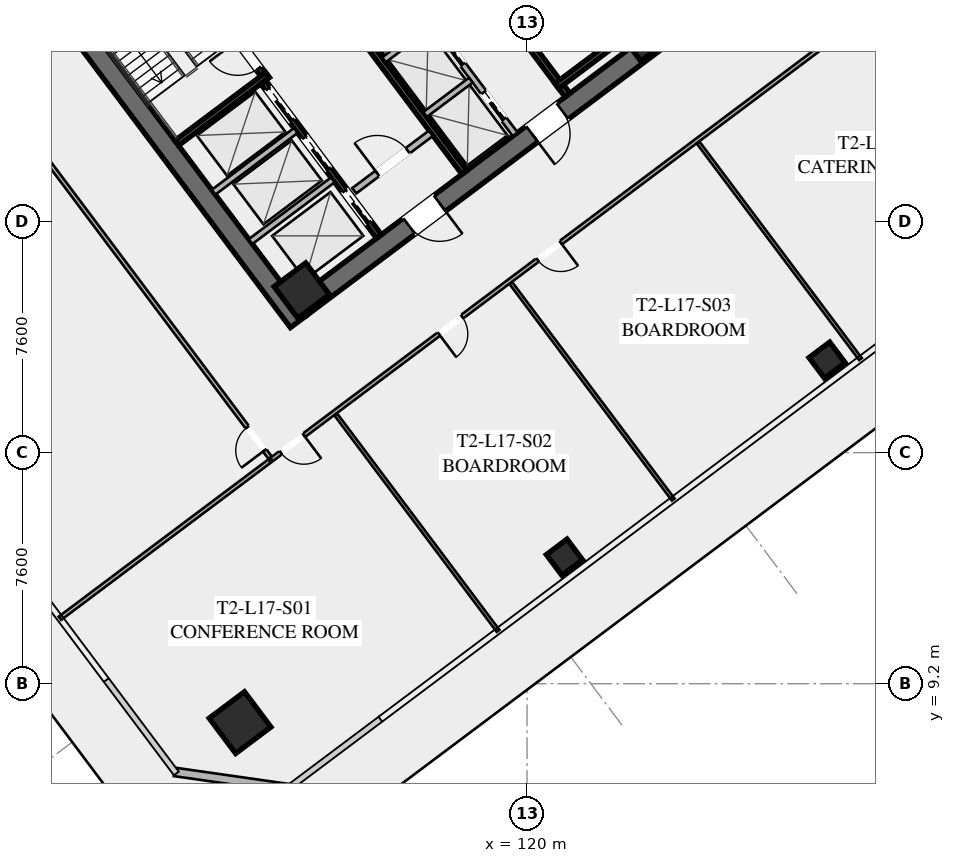
"""IFC4 building model, lengths in metres.
Left out: names, types, materials, properties, quantities, classifications, styles, units other than length and angle.
Written with IfcOpenShell. Run it as: python <this file> out.ifc"""

import sys

from ifc_helpers import new_model, si_unit, direction, frame, frame_2d, origin, origin_2d, place, context, subcontext, project, spatial, rectangle, hollow_rectangle, extrude, element, fill, save


model = new_model("IFC4")
c1 = context("Model", 3, precision=1e-05, world=origin(), true_north=direction((0.0, 1.0)))
c2 = subcontext(c1, "Body", "Model", "MODEL_VIEW")
j1 = project(units=[si_unit("LENGTHUNIT", "METRE"), si_unit("PLANEANGLEUNIT", "RADIAN")], contexts=[c1])
p1 = place(None, origin())
s1 = spatial("IfcSite", under=j1, at=p1, CompositionType="ELEMENT")
p2 = place(p1, origin())
s2 = spatial("IfcBuilding", under=s1, at=p2, CompositionType="ELEMENT")
p3 = place(p2, frame((0.0, 0.0, 67.2)))
s3 = spatial("IfcBuildingStorey", under=s2, at=p3, CompositionType="ELEMENT", Elevation=67.2)
p4 = place(p3, frame((112.476, 21.107, 0.0), z_axis=(0.0, 0.0, 1.0), x_axis=(-0.600005007985, 0.799996243986, 0.0)))
e1 = element("IfcWall", 1, at=p4, inside=s3, PredefinedType="SHEAR", context=c2, shape_type="SweptSolid", body=[
    extrude(rectangle(XDim=15.6, YDim=0.65, at=frame_2d((7.8, 0.0))), origin(), (0.0, 0.0, 1.0), 3.55),
])
p5 = place(p3, frame((124.429, 30.478, 0.0), z_axis=(0.0, 0.0, 1.0), x_axis=(-0.799998028465, -0.600002628705, 0.0)))
e2 = element("IfcWall", 2, at=p5, inside=s3, PredefinedType="SHEAR", context=c2, shape_type="SweptSolid", body=[
    extrude(rectangle(XDim=14.86, YDim=0.65, at=frame_2d((7.43, 0.0))), origin(), (0.0, 0.0, 1.0), 3.55),
])
p6 = place(p5, frame((9.13, 0.0, 0.0)))
e3 = element("IfcOpeningElement", 3, at=p6, cuts=e2, PredefinedType="OPENING", context=c2, shape_type="SweptSolid", body=[
    extrude(rectangle(XDim=1.25, YDim=2.25, at=frame_2d((0.625, 1.125))), frame((0.0, 0.335, 0.0), z_axis=(0.0, -1.0, 0.0), x_axis=(1.0, 0.0, 0.0)), (0.0, 0.0, 1.0), 0.67),
])
p7 = place(p5, frame((4.08, 0.0, 0.0)))
e4 = element("IfcOpeningElement", 4, at=p7, cuts=e2, PredefinedType="OPENING", context=c2, shape_type="SweptSolid", body=[
    extrude(rectangle(XDim=1.25, YDim=2.25, at=frame_2d((0.625, 1.125))), frame((0.0, 0.335, 0.0), z_axis=(0.0, -1.0, 0.0), x_axis=(1.0, 0.0, 0.0)), (0.0, 0.0, 1.0), 0.67),
])
for number, where, z_axis, x_axis in (
    (5, (112.59, 22.13, 0.0), (0.0, 0.0, 1.0), (0.8, 0.6, 0.0)),
    (6, (123.87, 30.59, 0.0), (0.0, 0.0, 1.0), (0.8, 0.6, 0.0)),
):
    element("IfcColumn", number, at=place(p3, frame(where, z_axis=z_axis, x_axis=x_axis)), inside=s3, PredefinedType="COLUMN", context=c2, shape_type="SweptSolid", body=[
        extrude(hollow_rectangle(XDim=1.3, YDim=1.3, WallThickness=0.05, at=origin_2d()), origin(), (0.0, 0.0, 1.0), 3.35),
    ])
p8 = place(p3, frame((110.56, 7.92, -0.195), z_axis=(0.0, 0.0, 1.0), x_axis=(0.799999996291, 0.600000004945, 0.0)))
e7 = element("IfcColumn", 7, at=p8, inside=s3, PredefinedType="COLUMN", context=c2, shape_type="SweptSolid", body=[
    extrude(hollow_rectangle(XDim=1.45, YDim=1.45, WallThickness=0.055, at=origin_2d()), origin(), (0.0, 0.0, 1.0), 3.545),
])
for number, where, z_axis, x_axis in (
    (8, (121.23, 13.36, -0.195), (0.0, 0.0, 1.0), (0.8, 0.6, 0.0)),
    (9, (129.87, 19.84, -0.195), (0.0, 0.0, 1.0), (0.8, 0.6, 0.0)),
):
    element("IfcColumn", number, at=place(p3, frame(where, z_axis=z_axis, x_axis=x_axis)), inside=s3, PredefinedType="COLUMN", context=c2, shape_type="SweptSolid", body=[
        extrude(hollow_rectangle(XDim=0.85, YDim=0.85, WallThickness=0.035, at=origin_2d()), origin(), (0.0, 0.0, 1.0), 3.545),
    ])
p9 = place(p3, frame((112.18, 5.76, 0.0), z_axis=(0.0, 0.0, 1.0), x_axis=(-0.989948214866, 0.141430307517, 0.0)))
e10 = element("IfcWall", 10, at=p9, inside=s3, PredefinedType="SOLIDWALL", context=c2, shape_type="SweptSolid", body=[
    extrude(rectangle(XDim=3.818, YDim=0.28, at=frame_2d((1.909, 0.0))), origin(), (0.0, 0.0, 1.0), 3.35),
])
p10 = place(p3, frame((111.44, 29.08, 0.0), z_axis=(0.0, 0.0, 1.0), x_axis=(-0.600009827119, 0.799992629566, 0.0)))
e11 = element("IfcWall", 11, at=p10, inside=s3, PredefinedType="SHEAR", context=c2, shape_type="SweptSolid", body=[
    extrude(rectangle(XDim=7.95, YDim=0.2, at=frame_2d((3.975, 0.0))), origin(), (0.0, 0.0, 1.0), 3.35),
])
p11 = place(p10, frame((0.45, 0.0, 0.0)))
e12 = element("IfcOpeningElement", 12, at=p11, cuts=e11, PredefinedType="OPENING", context=c2, shape_type="SweptSolid", body=[
    extrude(rectangle(XDim=1.15, YDim=2.2, at=frame_2d((0.575, 1.1))), frame((0.0, 0.11, 0.0), z_axis=(0.0, -1.0, 0.0), x_axis=(1.0, 0.0, 0.0)), (0.0, 0.0, 1.0), 0.22),
])
p12 = place(p3, frame((108.476, 26.982, 0.0), z_axis=(0.0, 0.0, 1.0), x_axis=(0.799984290658, 0.600020945218, 0.0)))
e13 = element("IfcWall", 13, at=p12, inside=s3, PredefinedType="SHEAR", context=c2, shape_type="SweptSolid", body=[
    extrude(rectangle(XDim=3.73, YDim=0.2, at=frame_2d((1.865, 0.0))), origin(), (0.0, 0.0, 1.0), 3.35),
])
p13 = place(p3, frame((116.56, 34.92, 0.0), z_axis=(0.0, 0.0, 1.0), x_axis=(0.600009827119, -0.799992629566, 0.0)))
e14 = element("IfcWall", 14, at=p13, inside=s3, PredefinedType="SHEAR", context=c2, shape_type="SweptSolid", body=[
    extrude(rectangle(XDim=7.95, YDim=0.2, at=frame_2d((3.975, 0.0))), origin(), (0.0, 0.0, 1.0), 3.35),
])
p14 = place(p13, frame((0.45, 0.0, 0.0)))
e15 = element("IfcOpeningElement", 15, at=p14, cuts=e14, PredefinedType="OPENING", context=c2, shape_type="SweptSolid", body=[
    extrude(rectangle(XDim=1.15, YDim=2.2, at=frame_2d((0.575, 1.1))), frame((0.0, 0.11, 0.0), z_axis=(0.0, -1.0, 0.0), x_axis=(1.0, 0.0, 0.0)), (0.0, 0.0, 1.0), 0.22),
])
p15 = place(p3, frame((120.98, 28.86, 0.0), z_axis=(0.0, 0.0, 1.0), x_axis=(0.800039270442, 0.59994763584, 0.0)))
e16 = element("IfcWall", 16, at=p15, inside=s3, PredefinedType="SHEAR", context=c2, shape_type="SweptSolid", body=[
    extrude(rectangle(XDim=3.73, YDim=0.2, at=frame_2d((1.865, 0.0))), origin(), (0.0, 0.0, 1.0), 3.35),
])
p16 = place(p3, frame((117.938, 26.016, 0.0), z_axis=(0.0, 0.0, 1.0), x_axis=(-0.600005463273, 0.799995902516, 0.0)))
e17 = element("IfcWall", 17, at=p16, inside=s3, PredefinedType="SHEAR", context=c2, shape_type="SweptSolid", body=[
    extrude(rectangle(XDim=14.3, YDim=0.2, at=frame_2d((7.15, 0.0))), origin(), (0.0, 0.0, 1.0), 3.35),
])
p17 = place(p3, frame((114.316, 25.412, 0.0), z_axis=(0.0, 0.0, 1.0), x_axis=(0.800018601094, 0.59997519774, 0.0)))
e18 = element("IfcWall", 18, at=p17, inside=s3, PredefinedType="SOLIDWALL", context=c2, shape_type="SweptSolid", body=[
    extrude(rectangle(XDim=3.15, YDim=0.22, at=frame_2d((1.575, 0.0))), origin(), (0.0, 0.0, 1.0), 2.703),
])
p18 = place(p17, frame((0.95, 0.0, 0.0)))
e19 = element("IfcOpeningElement", 19, at=p18, cuts=e18, PredefinedType="OPENING", context=c2, shape_type="SweptSolid", body=[
    extrude(rectangle(XDim=1.25, YDim=2.25, at=frame_2d((0.625, 1.125))), frame((0.0, 0.12, 0.0), z_axis=(0.0, -1.0, 0.0), x_axis=(1.0, 0.0, 0.0)), (0.0, 0.0, 1.0), 0.24),
])
p19 = place(p3, frame((115.13, 23.91, 0.0), z_axis=(0.0, 0.0, 1.0), x_axis=(-0.599975393228, 0.800018454488, 0.0)))
e20 = element("IfcWall", 20, at=p19, inside=s3, PredefinedType="SHEAR", context=c2, shape_type="SweptSolid", body=[
    extrude(rectangle(XDim=6.35, YDim=0.2, at=frame_2d((3.175, 0.0))), origin(), (0.0, 0.0, 1.0), 3.35),
])
p20 = place(p19, frame((4.775, 0.0, 0.0)))
e21 = element("IfcOpeningElement", 21, at=p20, cuts=e20, PredefinedType="OPENING", context=c2, shape_type="SweptSolid", body=[
    extrude(rectangle(XDim=1.3, YDim=2.25, at=frame_2d((0.65, 1.125))), frame((0.0, 0.11, 0.0), z_axis=(0.0, -1.0, 0.0), x_axis=(1.0, 0.0, 0.0)), (0.0, 0.0, 1.0), 0.22),
])
p21 = place(p19, frame((2.775, 0.0, 0.0)))
e22 = element("IfcOpeningElement", 22, at=p21, cuts=e20, PredefinedType="OPENING", context=c2, shape_type="SweptSolid", body=[
    extrude(rectangle(XDim=1.3, YDim=2.25, at=frame_2d((0.65, 1.125))), frame((0.0, 0.11, 0.0), z_axis=(0.0, -1.0, 0.0), x_axis=(1.0, 0.0, 0.0)), (0.0, 0.0, 1.0), 0.22),
])
p22 = place(p19, frame((0.575, 0.0, 0.0)))
e23 = element("IfcOpeningElement", 23, at=p22, cuts=e20, PredefinedType="OPENING", context=c2, shape_type="SweptSolid", body=[
    extrude(rectangle(XDim=1.3, YDim=2.25, at=frame_2d((0.65, 1.125))), frame((0.0, 0.11, 0.0), z_axis=(0.0, -1.0, 0.0), x_axis=(1.0, 0.0, 0.0)), (0.0, 0.0, 1.0), 0.22),
])
for number, where, z_axis, x_axis in (
    (24, (110.906, 23.742, 0.0), (0.0, 0.0, 1.0), (0.8, 0.6, 0.0)),
    (25, (109.688, 25.366, 0.0), (0.0, 0.0, 1.0), (0.8, 0.6, 0.0)),
):
    element("IfcWall", number, at=place(p3, frame(where, z_axis=z_axis, x_axis=x_axis)), inside=s3, PredefinedType="SOLIDWALL", context=c2, shape_type="SweptSolid", body=[
        extrude(rectangle(XDim=3.38, YDim=0.2, at=frame_2d((1.69, 0.0))), origin(), (0.0, 0.0, 1.0), 3.35),
    ])
p23 = place(p3, frame((119.61, 27.27, 0.0), z_axis=(0.0, 0.0, 1.0), x_axis=(-0.600011488909, 0.79999138319, 0.0)))
e26 = element("IfcWall", 26, at=p23, inside=s3, PredefinedType="SOLIDWALL", context=c2, shape_type="SweptSolid", body=[
    extrude(rectangle(XDim=6.8, YDim=0.2, at=frame_2d((3.4, 0.0))), origin(), (0.0, 0.0, 1.0), 3.35),
])
p24 = place(p23, frame((0.625, 0.0, 0.0)))
e27 = element("IfcOpeningElement", 27, at=p24, cuts=e26, PredefinedType="OPENING", context=c2, shape_type="SweptSolid", body=[
    extrude(rectangle(XDim=1.1, YDim=2.2, at=frame_2d((0.55, 1.1))), frame((0.0, 0.11, 0.0), z_axis=(0.0, -1.0, 0.0), x_axis=(1.0, 0.0, 0.0)), (0.0, 0.0, 1.0), 0.22),
])
p25 = place(p23, frame((2.875, 0.0, 0.0)))
e28 = element("IfcOpeningElement", 28, at=p25, cuts=e26, PredefinedType="OPENING", context=c2, shape_type="SweptSolid", body=[
    extrude(rectangle(XDim=1.1, YDim=2.2, at=frame_2d((0.55, 1.1))), frame((0.0, 0.11, 0.0), z_axis=(0.0, -1.0, 0.0), x_axis=(1.0, 0.0, 0.0)), (0.0, 0.0, 1.0), 0.22),
])
p26 = place(p23, frame((5.125, 0.0, 0.0)))
e29 = element("IfcOpeningElement", 29, at=p26, cuts=e26, PredefinedType="OPENING", context=c2, shape_type="SweptSolid", body=[
    extrude(rectangle(XDim=1.1, YDim=2.2, at=frame_2d((0.55, 1.1))), frame((0.0, 0.11, 0.0), z_axis=(0.0, -1.0, 0.0), x_axis=(1.0, 0.0, 0.0)), (0.0, 0.0, 1.0), 0.22),
])
p27 = place(p3, frame((116.646, 27.922, 0.0), z_axis=(0.0, 0.0, 1.0), x_axis=(0.8, 0.6, 0.0)))
e30 = element("IfcWall", 30, at=p27, inside=s3, PredefinedType="SOLIDWALL", context=c2, shape_type="SweptSolid", body=[
    extrude(rectangle(XDim=1.88, YDim=0.2, at=frame_2d((0.94, 0.0))), origin(), (0.0, 0.0, 1.0), 3.35),
])
p28 = place(p3, frame((115.296, 29.722, 0.0), z_axis=(0.0, 0.0, 1.0), x_axis=(0.799984418148, 0.600020775241, 0.0)))
e31 = element("IfcWall", 31, at=p28, inside=s3, PredefinedType="SOLIDWALL", context=c2, shape_type="SweptSolid", body=[
    extrude(rectangle(XDim=1.88, YDim=0.2, at=frame_2d((0.94, 0.0))), origin(), (0.0, 0.0, 1.0), 3.35),
])
p29 = place(p3, frame((134.18, 33.51, 0.0), z_axis=(0.0, 0.0, 1.0), x_axis=(-0.8, -0.6, 0.0)))
e32 = element("IfcWall", 32, at=p29, inside=s3, PredefinedType="PARTITIONING", context=c2, shape_type="SweptSolid", body=[
    extrude(rectangle(XDim=28.23, YDim=0.135, at=frame_2d((14.115, 0.0))), origin(), (0.0, 0.0, 1.0), 2.703),
])
p30 = place(p29, frame((26.9, 0.0, 0.0)))
e33 = element("IfcOpeningElement", 33, at=p30, cuts=e32, PredefinedType="OPENING", context=c2, shape_type="SweptSolid", body=[
    extrude(rectangle(XDim=0.95, YDim=2.05, at=frame_2d((0.475, 1.025))), frame((0.0, 0.077, 0.0), z_axis=(0.0, -1.0, 0.0), x_axis=(1.0, 0.0, 0.0)), (0.0, 0.0, 1.0), 0.155),
])
p31 = place(p29, frame((20.399, 0.0, 0.0)))
e34 = element("IfcOpeningElement", 34, at=p31, cuts=e32, PredefinedType="OPENING", context=c2, shape_type="SweptSolid", body=[
    extrude(rectangle(XDim=0.95, YDim=2.05, at=frame_2d((0.475, 1.025))), frame((0.0, 0.077, 0.0), z_axis=(0.0, -1.0, 0.0), x_axis=(1.0, 0.0, 0.0)), (0.0, 0.0, 1.0), 0.155),
])
p32 = place(p29, frame((16.339, 0.0, 0.0)))
e35 = element("IfcOpeningElement", 35, at=p32, cuts=e32, PredefinedType="OPENING", context=c2, shape_type="SweptSolid", body=[
    extrude(rectangle(XDim=0.95, YDim=2.05, at=frame_2d((0.475, 1.025))), frame((0.0, 0.077, 0.0), z_axis=(0.0, -1.0, 0.0), x_axis=(1.0, 0.0, 0.0)), (0.0, 0.0, 1.0), 0.155),
])
p33 = place(p29, frame((0.38, 0.0, 0.0)))
e36 = element("IfcOpeningElement", 36, at=p33, cuts=e32, PredefinedType="OPENING", context=c2, shape_type="SweptSolid", body=[
    extrude(rectangle(XDim=0.95, YDim=2.05, at=frame_2d((0.475, 1.025))), frame((0.0, 0.077, 0.0), z_axis=(0.0, -1.0, 0.0), x_axis=(1.0, 0.0, 0.0)), (0.0, 0.0, 1.0), 0.155),
])
for number, where, z_axis, x_axis in (
    (37, (119.048, 10.936, 0.0), (0.0, 0.0, 1.0), (-0.6, 0.8, 0.0)),
    (38, (124.808, 15.256, 0.0), (0.0, 0.0, 1.0), (-0.6, 0.8, 0.0)),
):
    element("IfcWall", number, at=place(p3, frame(where, z_axis=z_axis, x_axis=x_axis)), inside=s3, PredefinedType="PARTITIONING", context=c2, shape_type="SweptSolid", body=[
        extrude(rectangle(XDim=8.9, YDim=0.11, at=frame_2d((4.45, 0.0))), origin(), (0.0, 0.0, 1.0), 2.703),
    ])
p34 = place(p3, frame((130.968, 19.876, 0.0), z_axis=(0.0, 0.0, 1.0), x_axis=(-0.6, 0.8, 0.0)))
e39 = element("IfcWall", 39, at=p34, inside=s3, PredefinedType="PARTITIONING", context=c2, shape_type="SweptSolid", body=[
    extrude(rectangle(XDim=8.9, YDim=0.11, at=frame_2d((4.45, 0.0))), origin(), (0.0, 0.0, 1.0), 2.703),
])
p35 = place(p3, frame((111.548, 16.636, 0.0), z_axis=(0.0, 0.0, 1.0), x_axis=(-0.600003610192, 0.799997292343, 0.0)))
e40 = element("IfcWall", 40, at=p35, inside=s3, PredefinedType="PARTITIONING", context=c2, shape_type="SweptSolid", body=[
    extrude(rectangle(XDim=21.64, YDim=0.135, at=frame_2d((10.82, 0.0))), origin(), (0.0, 0.0, 1.0), 2.703),
])
p36 = place(p35, frame((0.3, 0.0, 0.0)))
e41 = element("IfcOpeningElement", 41, at=p36, cuts=e40, PredefinedType="OPENING", context=c2, shape_type="SweptSolid", body=[
    extrude(rectangle(XDim=0.95, YDim=2.05, at=frame_2d((0.475, 1.025))), frame((0.0, 0.077, 0.0), z_axis=(0.0, -1.0, 0.0), x_axis=(1.0, 0.0, 0.0)), (0.0, 0.0, 1.0), 0.155),
])
p37 = place(p3, frame((104.636, 11.352, 0.0), z_axis=(0.0, 0.0, 1.0), x_axis=(0.800006797429, 0.599990936654, 0.0)))
e42 = element("IfcWall", 42, at=p37, inside=s3, PredefinedType="PARTITIONING", context=c2, shape_type="SweptSolid", body=[
    extrude(rectangle(XDim=8.62, YDim=0.135, at=frame_2d((4.31, 0.0))), origin(), (0.0, 0.0, 1.0), 2.703),
])
p38 = place(p6, origin())
e43 = element("IfcDoor", 43, at=p38, inside=s3, OperationType="SINGLE_SWING_LEFT", PredefinedType="DOOR", context=c2, shape_type="SweptSolid", body=[
    extrude(rectangle(XDim=1.25, YDim=2.25, at=frame_2d((0.625, 1.125))), frame((0.0, 0.025, 0.0), z_axis=(0.0, -1.0, 0.0), x_axis=(1.0, 0.0, 0.0)), (0.0, 0.0, 1.0), 0.05),
])
fill(e3, e43)
p39 = place(p7, origin())
e44 = element("IfcDoor", 44, at=p39, inside=s3, OperationType="SINGLE_SWING_RIGHT", PredefinedType="DOOR", context=c2, shape_type="SweptSolid", body=[
    extrude(rectangle(XDim=1.25, YDim=2.25, at=frame_2d((0.625, 1.125))), frame((0.0, 0.025, 0.0), z_axis=(0.0, -1.0, 0.0), x_axis=(1.0, 0.0, 0.0)), (0.0, 0.0, 1.0), 0.05),
])
fill(e4, e44)
p40 = place(p11, origin())
e45 = element("IfcDoor", 45, at=p40, inside=s3, OperationType="SINGLE_SWING_RIGHT", PredefinedType="DOOR", context=c2, shape_type="SweptSolid", body=[
    extrude(rectangle(XDim=1.15, YDim=2.2, at=frame_2d((0.575, 1.1))), frame((0.0, 0.025, 0.0), z_axis=(0.0, -1.0, 0.0), x_axis=(1.0, 0.0, 0.0)), (0.0, 0.0, 1.0), 0.05),
])
fill(e12, e45)
p41 = place(p18, origin())
e46 = element("IfcDoor", 46, at=p41, inside=s3, OperationType="SINGLE_SWING_LEFT", PredefinedType="DOOR", context=c2, shape_type="SweptSolid", body=[
    extrude(rectangle(XDim=1.25, YDim=2.25, at=frame_2d((0.625, 1.125))), frame((0.0, 0.025, 0.0), z_axis=(0.0, -1.0, 0.0), x_axis=(1.0, 0.0, 0.0)), (0.0, 0.0, 1.0), 0.05),
])
fill(e19, e46)
p42 = place(p30, origin())
e47 = element("IfcDoor", 47, at=p42, inside=s3, OperationType="SINGLE_SWING_LEFT", PredefinedType="DOOR", context=c2, shape_type="SweptSolid", body=[
    extrude(rectangle(XDim=0.95, YDim=2.05, at=frame_2d((0.475, 1.025))), frame((0.0, 0.025, 0.0), z_axis=(0.0, -1.0, 0.0), x_axis=(1.0, 0.0, 0.0)), (0.0, 0.0, 1.0), 0.05),
])
fill(e33, e47)
p43 = place(p31, origin())
e48 = element("IfcDoor", 48, at=p43, inside=s3, OperationType="SINGLE_SWING_RIGHT", PredefinedType="DOOR", context=c2, shape_type="SweptSolid", body=[
    extrude(rectangle(XDim=0.95, YDim=2.05, at=frame_2d((0.475, 1.025))), frame((0.0, 0.025, 0.0), z_axis=(0.0, -1.0, 0.0), x_axis=(1.0, 0.0, 0.0)), (0.0, 0.0, 1.0), 0.05),
])
fill(e34, e48)
p44 = place(p32, origin())
e49 = element("IfcDoor", 49, at=p44, inside=s3, OperationType="SINGLE_SWING_LEFT", PredefinedType="DOOR", context=c2, shape_type="SweptSolid", body=[
    extrude(rectangle(XDim=0.95, YDim=2.05, at=frame_2d((0.475, 1.025))), frame((0.0, 0.025, 0.0), z_axis=(0.0, -1.0, 0.0), x_axis=(1.0, 0.0, 0.0)), (0.0, 0.0, 1.0), 0.05),
])
fill(e35, e49)
p45 = place(p36, origin())
e50 = element("IfcDoor", 50, at=p45, inside=s3, OperationType="SINGLE_SWING_LEFT", PredefinedType="DOOR", context=c2, shape_type="SweptSolid", body=[
    extrude(rectangle(XDim=0.95, YDim=2.05, at=frame_2d((0.475, 1.025))), frame((0.0, 0.025, 0.0), z_axis=(0.0, -1.0, 0.0), x_axis=(1.0, 0.0, 0.0)), (0.0, 0.0, 1.0), 0.05),
])
fill(e41, e50)
p46 = place(p20, origin())
e51 = element("IfcDoor", 51, at=p46, inside=s3, OperationType="SLIDING_TO_LEFT", PredefinedType="DOOR", context=c2, shape_type="SweptSolid", body=[
    extrude(rectangle(XDim=1.3, YDim=2.25, at=frame_2d((0.65, 1.125))), frame((0.0, 0.025, 0.0), z_axis=(0.0, -1.0, 0.0), x_axis=(1.0, 0.0, 0.0)), (0.0, 0.0, 1.0), 0.05),
])
fill(e21, e51)
p47 = place(p21, origin())
e52 = element("IfcDoor", 52, at=p47, inside=s3, OperationType="SLIDING_TO_LEFT", PredefinedType="DOOR", context=c2, shape_type="SweptSolid", body=[
    extrude(rectangle(XDim=1.3, YDim=2.25, at=frame_2d((0.65, 1.125))), frame((0.0, 0.025, 0.0), z_axis=(0.0, -1.0, 0.0), x_axis=(1.0, 0.0, 0.0)), (0.0, 0.0, 1.0), 0.05),
])
fill(e22, e52)
p48 = place(p22, origin())
e53 = element("IfcDoor", 53, at=p48, inside=s3, OperationType="SLIDING_TO_LEFT", PredefinedType="DOOR", context=c2, shape_type="SweptSolid", body=[
    extrude(rectangle(XDim=1.3, YDim=2.25, at=frame_2d((0.65, 1.125))), frame((0.0, 0.025, 0.0), z_axis=(0.0, -1.0, 0.0), x_axis=(1.0, 0.0, 0.0)), (0.0, 0.0, 1.0), 0.05),
])
fill(e23, e53)
p49 = place(p24, origin())
e54 = element("IfcDoor", 54, at=p49, inside=s3, OperationType="SLIDING_TO_LEFT", PredefinedType="DOOR", context=c2, shape_type="SweptSolid", body=[
    extrude(rectangle(XDim=1.1, YDim=2.2, at=frame_2d((0.55, 1.1))), frame((0.0, 0.025, 0.0), z_axis=(0.0, -1.0, 0.0), x_axis=(1.0, 0.0, 0.0)), (0.0, 0.0, 1.0), 0.05),
])
fill(e27, e54)
p50 = place(p25, origin())
e55 = element("IfcDoor", 55, at=p50, inside=s3, OperationType="SLIDING_TO_LEFT", PredefinedType="DOOR", context=c2, shape_type="SweptSolid", body=[
    extrude(rectangle(XDim=1.1, YDim=2.2, at=frame_2d((0.55, 1.1))), frame((0.0, 0.025, 0.0), z_axis=(0.0, -1.0, 0.0), x_axis=(1.0, 0.0, 0.0)), (0.0, 0.0, 1.0), 0.05),
])
fill(e28, e55)
save(model, sys.argv[1])
